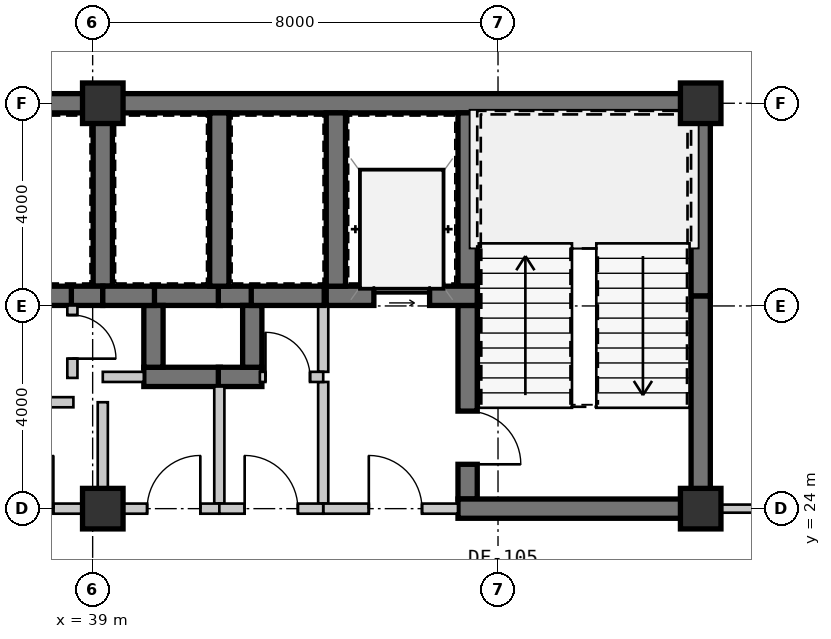
"""IFC4 building model, lengths in metres.
Left out: names, types, materials, properties, quantities, classifications, styles, units other than length and angle.
Written with IfcOpenShell. Run it as: python <this file> out.ifc"""

import sys

from ifc_helpers import new_model, si_unit, direction, frame, frame_2d, origin, origin_2d, place, context, subcontext, project, spatial, rectangle, extrude, source, transform, mapped, element, fill, save


model = new_model("IFC4")
c1 = context("Model", 3, precision=1e-05, world=origin(), true_north=direction((0.0, 1.0)))
c2 = subcontext(c1, "Body", "Model", "MODEL_VIEW")
j1 = project(units=[si_unit("LENGTHUNIT", "METRE"), si_unit("PLANEANGLEUNIT", "RADIAN")], contexts=[c1])
p1 = place(None, origin())
s1 = spatial("IfcSite", under=j1, at=p1, CompositionType="ELEMENT")
p2 = place(p1, origin())
s2 = spatial("IfcBuilding", under=s1, at=p2, CompositionType="ELEMENT")
p3 = place(p2, frame((0.0, 0.0, 45.15)))
s3 = spatial("IfcBuildingStorey", under=s2, at=p3, CompositionType="ELEMENT", Elevation=45.15)
m1 = source(origin(), c2, "Body", "SweptSolid", [
    extrude(rectangle(XDim=0.8, YDim=0.8, at=origin_2d()), origin(), (0.0, 0.0, 1.0), 3.15),
])
for number, where, z_axis, x_axis in (
    (1, (39.2, 24.0, 0.0), (0.0, 0.0, 1.0), (1.0, 0.0, 0.0)),
    (2, (51.0, 24.0, 0.0), (0.0, 0.0, 1.0), (1.0, 0.0, 0.0)),
    (3, (39.2, 32.0, 0.0), (0.0, 0.0, 1.0), (1.0, 0.0, 0.0)),
    (4, (51.0, 32.0, 0.0), (0.0, 0.0, 1.0), (1.0, 0.0, 0.0)),
):
    element("IfcColumn", number, at=place(p3, frame(where, z_axis=z_axis, x_axis=x_axis)), inside=s3, PredefinedType="COLUMN", context=c2, shape_type="MappedRepresentation", body=[
        mapped(m1, transform((0.0, 0.0, 0.0), scale=1.0)),
    ])
m2 = source(origin(), c2, "Body", "SweptSolid", [
    extrude(rectangle(XDim=11.2, YDim=0.38, at=frame_2d((5.6, 0.0))), origin(), (0.0, 0.0, 1.0), 2.93),
])
p4 = place(p3, frame((28.0, 32.0, 0.0), z_axis=(0.0, 0.0, 1.0), x_axis=(1.0, 0.0, 0.0)))
e5 = element("IfcWall", 5, at=p4, inside=s3, PredefinedType="SHEAR", context=c2, shape_type="MappedRepresentation", body=[
    mapped(m2, transform((0.0, 0.0, 0.0), scale=1.0)),
])
m3 = source(origin(), c2, "Body", "SweptSolid", [
    extrude(rectangle(XDim=11.99, YDim=0.38, at=frame_2d((5.995, 0.0))), origin(), (0.0, 0.0, 1.0), 2.93),
])
p5 = place(p3, frame((39.2, 32.0, 0.0), z_axis=(0.0, 0.0, 1.0), x_axis=(1.0, 0.0, 0.0)))
e6 = element("IfcWall", 6, at=p5, inside=s3, PredefinedType="SHEAR", context=c2, shape_type="MappedRepresentation", body=[
    mapped(m3, transform((0.0, 0.0, 0.0), scale=1.0)),
])
m4 = source(origin(), c2, "Body", "SweptSolid", [
    extrude(rectangle(XDim=4.01, YDim=0.38, at=frame_2d((2.005, 0.0))), origin(), (0.0, 0.0, 1.0), 2.93),
])
p6 = place(p3, frame((51.0, 24.19, 0.0), z_axis=(0.0, 0.0, 1.0), x_axis=(0.0, 1.0, 0.0)))
e7 = element("IfcWall", 7, at=p6, inside=s3, PredefinedType="SHEAR", context=c2, shape_type="MappedRepresentation", body=[
    mapped(m4, transform((0.0, 0.0, 0.0), scale=1.0)),
])
m5 = source(origin(), c2, "Body", "SweptSolid", [
    extrude(rectangle(XDim=3.61, YDim=0.38, at=frame_2d((1.805, 0.0))), origin(), (0.0, 0.0, 1.0), 2.93),
])
p7 = place(p3, frame((51.0, 28.2, 0.0), z_axis=(0.0, 0.0, 1.0), x_axis=(0.0, 1.0, 0.0)))
e8 = element("IfcWall", 8, at=p7, inside=s3, PredefinedType="SHEAR", context=c2, shape_type="MappedRepresentation", body=[
    mapped(m5, transform((0.0, 0.0, 0.0), scale=1.0)),
])
m6 = source(origin(), c2, "Body", "SweptSolid", [
    extrude(rectangle(XDim=3.42, YDim=0.38, at=frame_2d((1.71, 0.0))), origin(), (0.0, 0.0, 1.0), 2.93),
])
p8 = place(p3, frame((46.4, 31.81, 0.0), z_axis=(0.0, 0.0, 1.0), x_axis=(0.0, -1.0, 0.0)))
e9 = element("IfcWall", 9, at=p8, inside=s3, PredefinedType="SHEAR", context=c2, shape_type="MappedRepresentation", body=[
    mapped(m6, transform((0.0, 0.0, 0.0), scale=1.0)),
])
m7 = source(origin(), c2, "Body", "SweptSolid", [
    extrude(rectangle(XDim=3.82, YDim=0.38, at=frame_2d((1.91, 0.0))), origin(), (0.0, 0.0, 1.0), 2.93),
])
p9 = place(p3, frame((46.4, 28.01, 0.0), z_axis=(0.0, 0.0, 1.0), x_axis=(0.0, -1.0, 0.0)))
e10 = element("IfcWall", 10, at=p9, inside=s3, PredefinedType="SHEAR", context=c2, shape_type="MappedRepresentation", body=[
    mapped(m7, transform((0.0, 0.0, 0.0), scale=1.0)),
])
m8 = source(origin(), c2, "Body", "SweptSolid", [
    extrude(rectangle(XDim=1.05, YDim=2.1, at=frame_2d((0.525, 1.05))), frame((0.0, 0.2, 0.0), z_axis=(0.0, -1.0, 0.0), x_axis=(1.0, 0.0, 0.0)), (0.0, 0.0, 1.0), 0.4),
])
p10 = place(p9, frame((2.085, 0.0, 0.0)))
e11 = element("IfcOpeningElement", 11, at=p10, cuts=e10, PredefinedType="OPENING", context=c2, shape_type="MappedRepresentation", body=[
    mapped(m8, transform((0.0, 0.0, 0.0), scale=1.0)),
])
m9 = source(origin(), c2, "Body", "SweptSolid", [
    extrude(rectangle(XDim=4.98, YDim=0.38, at=frame_2d((2.49, 0.0))), origin(), (0.0, 0.0, 1.0), 2.93),
])
p11 = place(p3, frame((46.21, 24.0, 0.0), z_axis=(0.0, 0.0, 1.0), x_axis=(1.0, 0.0, 0.0)))
e12 = element("IfcWall", 12, at=p11, inside=s3, PredefinedType="SHEAR", context=c2, shape_type="MappedRepresentation", body=[
    mapped(m9, transform((0.0, 0.0, 0.0), scale=1.0)),
])
m10 = source(origin(), c2, "Body", "SweptSolid", [
    extrude(rectangle(XDim=2.98, YDim=0.38, at=frame_2d((1.49, 0.0))), origin(), (0.0, 0.0, 1.0), 2.93),
])
p12 = place(p3, frame((43.61, 28.2, 0.0), z_axis=(0.0, 0.0, 1.0), x_axis=(1.0, 0.0, 0.0)))
e13 = element("IfcWall", 13, at=p12, inside=s3, PredefinedType="SHEAR", context=c2, shape_type="MappedRepresentation", body=[
    mapped(m10, transform((0.0, 0.0, 0.0), scale=1.0)),
])
m11 = source(origin(), c2, "Body", "SweptSolid", [
    extrude(rectangle(XDim=1.1, YDim=2.15, at=frame_2d((0.55, 1.075))), frame((0.0, 0.2, 0.0), z_axis=(0.0, -1.0, 0.0), x_axis=(1.0, 0.0, 0.0)), (0.0, 0.0, 1.0), 0.4),
])
p13 = place(p12, frame((0.94, 0.0, 0.0)))
e14 = element("IfcOpeningElement", 14, at=p13, cuts=e13, PredefinedType="OPENING", context=c2, shape_type="MappedRepresentation", body=[
    mapped(m11, transform((0.0, 0.0, 0.0), scale=1.0)),
])
p14 = place(p3, frame((43.8, 31.81, 0.0), z_axis=(0.0, 0.0, 1.0), x_axis=(0.0, -1.0, 0.0)))
e15 = element("IfcWall", 15, at=p14, inside=s3, PredefinedType="SHEAR", context=c2, shape_type="MappedRepresentation", body=[
    mapped(m6, transform((0.0, 0.0, 0.0), scale=1.0)),
])
m12 = source(origin(), c2, "Body", "SweptSolid", [
    extrude(rectangle(XDim=2.4, YDim=0.2, at=frame_2d((1.2, 0.0))), origin(), (0.0, 0.0, 1.0), 2.93),
])
p15 = place(p3, frame((43.55, 26.5, 0.0), z_axis=(0.0, 0.0, 1.0), x_axis=(0.0, -1.0, 0.0)))
e16 = element("IfcWall", 16, at=p15, inside=s3, PredefinedType="SOLIDWALL", context=c2, shape_type="MappedRepresentation", body=[
    mapped(m12, transform((0.0, 0.0, 0.0), scale=1.0)),
])
m13 = source(origin(), c2, "Body", "SweptSolid", [
    extrude(rectangle(XDim=1.31, YDim=0.2, at=frame_2d((0.655, 0.0))), origin(), (0.0, 0.0, 1.0), 2.93),
])
p16 = place(p3, frame((43.55, 28.01, 0.0), z_axis=(0.0, 0.0, 1.0), x_axis=(0.0, -1.0, 0.0)))
e17 = element("IfcWall", 17, at=p16, inside=s3, PredefinedType="SOLIDWALL", context=c2, shape_type="MappedRepresentation", body=[
    mapped(m13, transform((0.0, 0.0, 0.0), scale=1.0)),
])
m14 = source(origin(), c2, "Body", "SweptSolid", [
    extrude(rectangle(XDim=2.66, YDim=0.2, at=frame_2d((1.33, 0.0))), origin(), (0.0, 0.0, 1.0), 2.397),
])
p17 = place(p3, frame((43.55, 24.0, 0.0), z_axis=(0.0, 0.0, 1.0), x_axis=(1.0, 0.0, 0.0)))
e18 = element("IfcWall", 18, at=p17, inside=s3, PredefinedType="SOLIDWALL", context=c2, shape_type="MappedRepresentation", body=[
    mapped(m14, transform((0.0, 0.0, 0.0), scale=1.0)),
])
m15 = source(origin(), c2, "Body", "SweptSolid", [
    extrude(rectangle(XDim=1.05, YDim=2.1, at=frame_2d((0.525, 1.05))), frame((0.0, 0.11, 0.0), z_axis=(0.0, -1.0, 0.0), x_axis=(1.0, 0.0, 0.0)), (0.0, 0.0, 1.0), 0.22),
])
p18 = place(p17, frame((0.9, 0.0, 0.0)))
e19 = element("IfcOpeningElement", 19, at=p18, cuts=e18, PredefinedType="OPENING", context=c2, shape_type="MappedRepresentation", body=[
    mapped(m15, transform((0.0, 0.0, 0.0), scale=1.0)),
])
m16 = source(origin(), c2, "Body", "SweptSolid", [
    extrude(rectangle(XDim=1.32, YDim=0.38, at=frame_2d((0.66, 0.0))), origin(), (0.0, 0.0, 1.0), 2.93),
])
p19 = place(p3, frame((41.52, 28.2, 0.0), z_axis=(0.0, 0.0, 1.0), x_axis=(-1.0, 0.0, 0.0)))
e20 = element("IfcWall", 20, at=p19, inside=s3, PredefinedType="SHEAR", context=c2, shape_type="MappedRepresentation", body=[
    mapped(m16, transform((0.0, 0.0, 0.0), scale=1.0)),
])
m17 = source(origin(), c2, "Body", "SweptSolid", [
    extrude(rectangle(XDim=0.67, YDim=0.38, at=frame_2d((0.335, 0.0))), origin(), (0.0, 0.0, 1.0), 2.93),
])
p20 = place(p3, frame((42.15, 28.2, 0.0), z_axis=(0.0, 0.0, 1.0), x_axis=(-1.0, 0.0, 0.0)))
e21 = element("IfcWall", 21, at=p20, inside=s3, PredefinedType="SHEAR", context=c2, shape_type="MappedRepresentation", body=[
    mapped(m17, transform((0.0, 0.0, 0.0), scale=1.0)),
])
m18 = source(origin(), c2, "Body", "SweptSolid", [
    extrude(rectangle(XDim=1.51, YDim=0.38, at=frame_2d((0.755, 0.0))), origin(), (0.0, 0.0, 1.0), 2.93),
])
p21 = place(p3, frame((40.01, 26.6, 0.0), z_axis=(0.0, 0.0, 1.0), x_axis=(1.0, 0.0, 0.0)))
e22 = element("IfcWall", 22, at=p21, inside=s3, PredefinedType="SHEAR", context=c2, shape_type="MappedRepresentation", body=[
    mapped(m18, transform((0.0, 0.0, 0.0), scale=1.0)),
])
m19 = source(origin(), c2, "Body", "SweptSolid", [
    extrude(rectangle(XDim=1.22, YDim=0.38, at=frame_2d((0.61, 0.0))), origin(), (0.0, 0.0, 1.0), 2.93),
])
p22 = place(p3, frame((40.2, 28.01, 0.0), z_axis=(0.0, 0.0, 1.0), x_axis=(0.0, -1.0, 0.0)))
e23 = element("IfcWall", 23, at=p22, inside=s3, PredefinedType="SHEAR", context=c2, shape_type="MappedRepresentation", body=[
    mapped(m19, transform((0.0, 0.0, 0.0), scale=1.0)),
])
m20 = source(origin(), c2, "Body", "SweptSolid", [
    extrude(rectangle(XDim=0.86, YDim=0.38, at=frame_2d((0.43, 0.0))), origin(), (0.0, 0.0, 1.0), 2.93),
])
p23 = place(p3, frame((41.48, 26.6, 0.0), z_axis=(0.0, 0.0, 1.0), x_axis=(1.0, 0.0, 0.0)))
e24 = element("IfcWall", 24, at=p23, inside=s3, PredefinedType="SHEAR", context=c2, shape_type="MappedRepresentation", body=[
    mapped(m20, transform((0.0, 0.0, 0.0), scale=1.0)),
])
p24 = place(p3, frame((42.15, 26.79, 0.0), z_axis=(0.0, 0.0, 1.0), x_axis=(0.0, 1.0, 0.0)))
e25 = element("IfcWall", 25, at=p24, inside=s3, PredefinedType="SHEAR", context=c2, shape_type="MappedRepresentation", body=[
    mapped(m19, transform((0.0, 0.0, 0.0), scale=1.0)),
])
p25 = place(p3, frame((39.2, 28.39, 0.0), z_axis=(0.0, 0.0, 1.0), x_axis=(0.0, 1.0, 0.0)))
e26 = element("IfcWall", 26, at=p25, inside=s3, PredefinedType="SHEAR", context=c2, shape_type="MappedRepresentation", body=[
    mapped(m6, transform((0.0, 0.0, 0.0), scale=1.0)),
])
m21 = source(origin(), c2, "Body", "SweptSolid", [
    extrude(rectangle(XDim=1.96, YDim=0.38, at=frame_2d((0.98, 0.0))), origin(), (0.0, 0.0, 1.0), 2.93),
])
p26 = place(p3, frame((36.66, 28.2, 0.0), z_axis=(0.0, 0.0, 1.0), x_axis=(1.0, 0.0, 0.0)))
e27 = element("IfcWall", 27, at=p26, inside=s3, PredefinedType="SHEAR", context=c2, shape_type="MappedRepresentation", body=[
    mapped(m21, transform((0.0, 0.0, 0.0), scale=1.0)),
])
m22 = source(origin(), c2, "Body", "SweptSolid", [
    extrude(rectangle(XDim=0.62, YDim=0.38, at=frame_2d((0.31, 0.0))), origin(), (0.0, 0.0, 1.0), 2.93),
])
p27 = place(p3, frame((38.58, 28.2, 0.0), z_axis=(0.0, 0.0, 1.0), x_axis=(1.0, 0.0, 0.0)))
e28 = element("IfcWall", 28, at=p27, inside=s3, PredefinedType="SHEAR", context=c2, shape_type="MappedRepresentation", body=[
    mapped(m22, transform((0.0, 0.0, 0.0), scale=1.0)),
])
p28 = place(p3, frame((41.5, 28.39, 0.0), z_axis=(0.0, 0.0, 1.0), x_axis=(0.0, 1.0, 0.0)))
e29 = element("IfcWall", 29, at=p28, inside=s3, PredefinedType="SHEAR", context=c2, shape_type="MappedRepresentation", body=[
    mapped(m6, transform((0.0, 0.0, 0.0), scale=1.0)),
])
m23 = source(origin(), c2, "Body", "SweptSolid", [
    extrude(rectangle(XDim=1.02, YDim=0.38, at=frame_2d((0.51, 0.0))), origin(), (0.0, 0.0, 1.0), 2.93),
])
p29 = place(p3, frame((39.2, 28.2, 0.0), z_axis=(0.0, 0.0, 1.0), x_axis=(1.0, 0.0, 0.0)))
e30 = element("IfcWall", 30, at=p29, inside=s3, PredefinedType="SHEAR", context=c2, shape_type="MappedRepresentation", body=[
    mapped(m23, transform((0.0, 0.0, 0.0), scale=1.0)),
])
m24 = source(origin(), c2, "Body", "SweptSolid", [
    extrude(rectangle(XDim=1.44, YDim=0.38, at=frame_2d((0.72, 0.0))), origin(), (0.0, 0.0, 1.0), 2.93),
])
p30 = place(p3, frame((42.13, 28.2, 0.0), z_axis=(0.0, 0.0, 1.0), x_axis=(1.0, 0.0, 0.0)))
e31 = element("IfcWall", 31, at=p30, inside=s3, PredefinedType="SHEAR", context=c2, shape_type="MappedRepresentation", body=[
    mapped(m24, transform((0.0, 0.0, 0.0), scale=1.0)),
])
m25 = source(origin(), c2, "Body", "SweptSolid", [
    extrude(rectangle(XDim=2.42, YDim=0.2, at=frame_2d((1.21, 0.0))), origin(), (0.0, 0.0, 1.0), 2.93),
])
p31 = place(p3, frame((36.2, 26.1, 0.0), z_axis=(0.0, 0.0, 1.0), x_axis=(1.0, 0.0, 0.0)))
e32 = element("IfcWall", 32, at=p31, inside=s3, PredefinedType="SOLIDWALL", context=c2, shape_type="MappedRepresentation", body=[
    mapped(m25, transform((0.0, 0.0, 0.0), scale=1.0)),
])
p32 = place(p31, frame((0.685, 0.0, 0.0)))
e33 = element("IfcOpeningElement", 33, at=p32, cuts=e32, PredefinedType="OPENING", context=c2, shape_type="MappedRepresentation", body=[
    mapped(m15, transform((0.0, 0.0, 0.0), scale=1.0)),
])
m26 = source(origin(), c2, "Body", "SweptSolid", [
    extrude(rectangle(XDim=2.0, YDim=0.2, at=frame_2d((1.0, 0.0))), origin(), (0.0, 0.0, 1.0), 2.47),
])
p33 = place(p3, frame((39.2, 26.1, 0.0), z_axis=(0.0, 0.0, 1.0), x_axis=(0.0, -1.0, 0.0)))
e34 = element("IfcWall", 34, at=p33, inside=s3, PredefinedType="SOLIDWALL", context=c2, shape_type="MappedRepresentation", body=[
    mapped(m26, transform((0.0, 0.0, 0.0), scale=1.0)),
])
m27 = source(origin(), c2, "Body", "SweptSolid", [
    extrude(rectangle(XDim=3.0, YDim=0.2, at=frame_2d((1.5, 0.0))), origin(), (0.0, 0.0, 1.0), 2.47),
])
p34 = place(p3, frame((39.2, 24.0, 0.0), z_axis=(0.0, 0.0, 1.0), x_axis=(-1.0, 0.0, 0.0)))
e35 = element("IfcWall", 35, at=p34, inside=s3, PredefinedType="SOLIDWALL", context=c2, shape_type="MappedRepresentation", body=[
    mapped(m27, transform((0.0, 0.0, 0.0), scale=1.0)),
])
p35 = place(p34, frame((0.975, 0.0, 0.0)))
e36 = element("IfcOpeningElement", 36, at=p35, cuts=e35, PredefinedType="OPENING", context=c2, shape_type="MappedRepresentation", body=[
    mapped(m15, transform((0.0, 0.0, 0.0), scale=1.0)),
])
m28 = source(origin(), c2, "Body", "SweptSolid", [
    extrude(rectangle(XDim=1.43, YDim=0.2, at=frame_2d((0.715, 0.0))), origin(), (0.0, 0.0, 1.0), 2.93),
])
p36 = place(p3, frame((38.6, 28.01, 0.0), z_axis=(0.0, 0.0, 1.0), x_axis=(0.0, -1.0, 0.0)))
e37 = element("IfcWall", 37, at=p36, inside=s3, PredefinedType="SOLIDWALL", context=c2, shape_type="MappedRepresentation", body=[
    mapped(m28, transform((0.0, 0.0, 0.0), scale=1.0)),
])
m29 = source(origin(), c2, "Body", "SweptSolid", [
    extrude(rectangle(XDim=0.86, YDim=2.1, at=frame_2d((0.43, 1.05))), frame((0.0, 0.11, 0.0), z_axis=(0.0, -1.0, 0.0), x_axis=(1.0, 0.0, 0.0)), (0.0, 0.0, 1.0), 0.22),
])
p37 = place(p36, frame((0.19, 0.0, 0.0)))
e38 = element("IfcOpeningElement", 38, at=p37, cuts=e37, PredefinedType="OPENING", context=c2, shape_type="MappedRepresentation", body=[
    mapped(m29, transform((0.0, 0.0, 0.0), scale=1.0)),
])
m30 = source(origin(), c2, "Body", "SweptSolid", [
    extrude(rectangle(XDim=0.81, YDim=0.2, at=frame_2d((0.405, 0.0))), origin(), (0.0, 0.0, 1.0), 2.93),
])
p38 = place(p3, frame((39.2, 26.6, 0.0), z_axis=(0.0, 0.0, 1.0), x_axis=(1.0, 0.0, 0.0)))
e39 = element("IfcWall", 39, at=p38, inside=s3, PredefinedType="SOLIDWALL", context=c2, shape_type="MappedRepresentation", body=[
    mapped(m30, transform((0.0, 0.0, 0.0), scale=1.0)),
])
m31 = source(origin(), c2, "Body", "SweptSolid", [
    extrude(rectangle(XDim=2.31, YDim=0.2, at=frame_2d((1.155, 0.0))), origin(), (0.0, 0.0, 1.0), 2.93),
])
p39 = place(p3, frame((41.5, 26.41, 0.0), z_axis=(0.0, 0.0, 1.0), x_axis=(0.0, -1.0, 0.0)))
e40 = element("IfcWall", 40, at=p39, inside=s3, PredefinedType="SOLIDWALL", context=c2, shape_type="MappedRepresentation", body=[
    mapped(m31, transform((0.0, 0.0, 0.0), scale=1.0)),
])
m32 = source(origin(), c2, "Body", "SweptSolid", [
    extrude(rectangle(XDim=2.3, YDim=0.2, at=frame_2d((1.15, 0.0))), origin(), (0.0, 0.0, 1.0), 2.397),
])
p40 = place(p3, frame((41.5, 24.0, 0.0), z_axis=(0.0, 0.0, 1.0), x_axis=(-1.0, 0.0, 0.0)))
e41 = element("IfcWall", 41, at=p40, inside=s3, PredefinedType="SOLIDWALL", context=c2, shape_type="MappedRepresentation", body=[
    mapped(m32, transform((0.0, 0.0, 0.0), scale=1.0)),
])
p41 = place(p40, frame((0.375, 0.0, 0.0)))
e42 = element("IfcOpeningElement", 42, at=p41, cuts=e41, PredefinedType="OPENING", context=c2, shape_type="MappedRepresentation", body=[
    mapped(m15, transform((0.0, 0.0, 0.0), scale=1.0)),
])
m33 = source(origin(), c2, "Body", "SweptSolid", [
    extrude(rectangle(XDim=1.25, YDim=0.2, at=frame_2d((0.625, 0.0))), origin(), (0.0, 0.0, 1.0), 2.93),
])
p42 = place(p3, frame((42.3, 26.6, 0.0), z_axis=(0.0, 0.0, 1.0), x_axis=(1.0, 0.0, 0.0)))
e43 = element("IfcWall", 43, at=p42, inside=s3, PredefinedType="SOLIDWALL", context=c2, shape_type="MappedRepresentation", body=[
    mapped(m33, transform((0.0, 0.0, 0.0), scale=1.0)),
])
m34 = source(origin(), c2, "Body", "SweptSolid", [
    extrude(rectangle(XDim=0.88, YDim=2.1, at=frame_2d((0.44, 1.05))), frame((0.0, 0.11, 0.0), z_axis=(0.0, -1.0, 0.0), x_axis=(1.0, 0.0, 0.0)), (0.0, 0.0, 1.0), 0.22),
])
p43 = place(p42, frame((0.11, 0.0, 0.0)))
e44 = element("IfcOpeningElement", 44, at=p43, cuts=e43, PredefinedType="OPENING", context=c2, shape_type="MappedRepresentation", body=[
    mapped(m34, transform((0.0, 0.0, 0.0), scale=1.0)),
])
m35 = source(origin(), c2, "Body", "SweptSolid", [
    extrude(rectangle(XDim=2.05, YDim=0.2, at=frame_2d((1.025, 0.0))), origin(), (0.0, 0.0, 1.0), 2.397),
])
p44 = place(p3, frame((43.55, 24.0, 0.0), z_axis=(0.0, 0.0, 1.0), x_axis=(-1.0, 0.0, 0.0)))
e45 = element("IfcWall", 45, at=p44, inside=s3, PredefinedType="SOLIDWALL", context=c2, shape_type="MappedRepresentation", body=[
    mapped(m35, transform((0.0, 0.0, 0.0), scale=1.0)),
])
p45 = place(p44, frame((0.5, 0.0, 0.0)))
e46 = element("IfcOpeningElement", 46, at=p45, cuts=e45, PredefinedType="OPENING", context=c2, shape_type="MappedRepresentation", body=[
    mapped(m15, transform((0.0, 0.0, 0.0), scale=1.0)),
])
m36 = source(origin(), c2, "Body", "SweptSolid", [
    extrude(rectangle(XDim=4.13, YDim=0.16, at=frame_2d((2.065, 0.0))), origin(), (0.0, 0.0, 1.0), 2.93),
])
p46 = place(p3, frame((51.19, 24.0, 0.0), z_axis=(0.0, 0.0, 1.0), x_axis=(1.0, 0.0, 0.0)))
e47 = element("IfcWall", 47, at=p46, inside=s3, PredefinedType="PARTITIONING", context=c2, shape_type="MappedRepresentation", body=[
    mapped(m36, transform((0.0, 0.0, 0.0), scale=1.0)),
])
m37 = source(origin(), c2, "Body", "SweptSolid", [
    extrude(rectangle(XDim=1.05, YDim=2.1, at=frame_2d((0.525, 1.05))), frame((0.0, 0.025, 0.0), z_axis=(0.0, -1.0, 0.0), x_axis=(1.0, 0.0, 0.0)), (0.0, 0.0, 1.0), 0.05),
])
p47 = place(p10, origin())
e48 = element("IfcDoor", 48, at=p47, inside=s3, OperationType="SINGLE_SWING_RIGHT", PredefinedType="DOOR", context=c2, shape_type="MappedRepresentation", body=[
    mapped(m37, transform((0.0, 0.0, 0.0), scale=1.0)),
])
fill(e11, e48)
m38 = source(origin(), c2, "Body", "SweptSolid", [
    extrude(rectangle(XDim=1.1, YDim=2.15, at=frame_2d((0.55, 1.075))), frame((0.0, 0.025, 0.0), z_axis=(0.0, -1.0, 0.0), x_axis=(1.0, 0.0, 0.0)), (0.0, 0.0, 1.0), 0.05),
])
p48 = place(p13, origin())
e49 = element("IfcDoor", 49, at=p48, inside=s3, OperationType="SLIDING_TO_LEFT", PredefinedType="DOOR", context=c2, shape_type="MappedRepresentation", body=[
    mapped(m38, transform((0.0, 0.0, 0.0), scale=1.0)),
])
fill(e14, e49)
p49 = place(p18, origin())
e50 = element("IfcDoor", 50, at=p49, inside=s3, OperationType="SINGLE_SWING_LEFT", PredefinedType="DOOR", context=c2, shape_type="MappedRepresentation", body=[
    mapped(m37, transform((0.0, 0.0, 0.0), scale=1.0)),
])
fill(e19, e50)
p50 = place(p35, frame((1.05, 0.0, 0.0), z_axis=(0.0, 0.0, 1.0), x_axis=(-1.0, 0.0, 0.0)))
e51 = element("IfcDoor", 51, at=p50, inside=s3, OperationType="SINGLE_SWING_RIGHT", PredefinedType="DOOR", context=c2, shape_type="MappedRepresentation", body=[
    mapped(m37, transform((0.0, 0.0, 0.0), scale=1.0)),
])
fill(e36, e51)
p51 = place(p41, frame((1.05, 0.0, 0.0), z_axis=(0.0, 0.0, 1.0), x_axis=(-1.0, 0.0, 0.0)))
e52 = element("IfcDoor", 52, at=p51, inside=s3, OperationType="SINGLE_SWING_RIGHT", PredefinedType="DOOR", context=c2, shape_type="MappedRepresentation", body=[
    mapped(m37, transform((0.0, 0.0, 0.0), scale=1.0)),
])
fill(e42, e52)
m39 = source(origin(), c2, "Body", "SweptSolid", [
    extrude(rectangle(XDim=0.88, YDim=2.1, at=frame_2d((0.44, 1.05))), frame((0.0, 0.025, 0.0), z_axis=(0.0, -1.0, 0.0), x_axis=(1.0, 0.0, 0.0)), (0.0, 0.0, 1.0), 0.05),
])
p52 = place(p43, origin())
e53 = element("IfcDoor", 53, at=p52, inside=s3, OperationType="SINGLE_SWING_LEFT", PredefinedType="DOOR", context=c2, shape_type="MappedRepresentation", body=[
    mapped(m39, transform((0.0, 0.0, 0.0), scale=1.0)),
])
fill(e44, e53)
p53 = place(p45, frame((1.05, 0.0, 0.0), z_axis=(0.0, 0.0, 1.0), x_axis=(-1.0, 0.0, 0.0)))
e54 = element("IfcDoor", 54, at=p53, inside=s3, OperationType="SINGLE_SWING_LEFT", PredefinedType="DOOR", context=c2, shape_type="MappedRepresentation", body=[
    mapped(m37, transform((0.0, 0.0, 0.0), scale=1.0)),
])
fill(e46, e54)
m40 = source(origin(), c2, "Body", "SweptSolid", [
    extrude(rectangle(XDim=0.86, YDim=2.1, at=frame_2d((0.43, 1.05))), frame((0.0, 0.025, 0.0), z_axis=(0.0, -1.0, 0.0), x_axis=(1.0, 0.0, 0.0)), (0.0, 0.0, 1.0), 0.05),
])
p54 = place(p37, origin())
e55 = element("IfcDoor", 55, at=p54, inside=s3, OperationType="SINGLE_SWING_RIGHT", PredefinedType="DOOR", context=c2, shape_type="MappedRepresentation", body=[
    mapped(m40, transform((0.0, 0.0, 0.0), scale=1.0)),
])
fill(e38, e55)
save(model, sys.argv[1])
